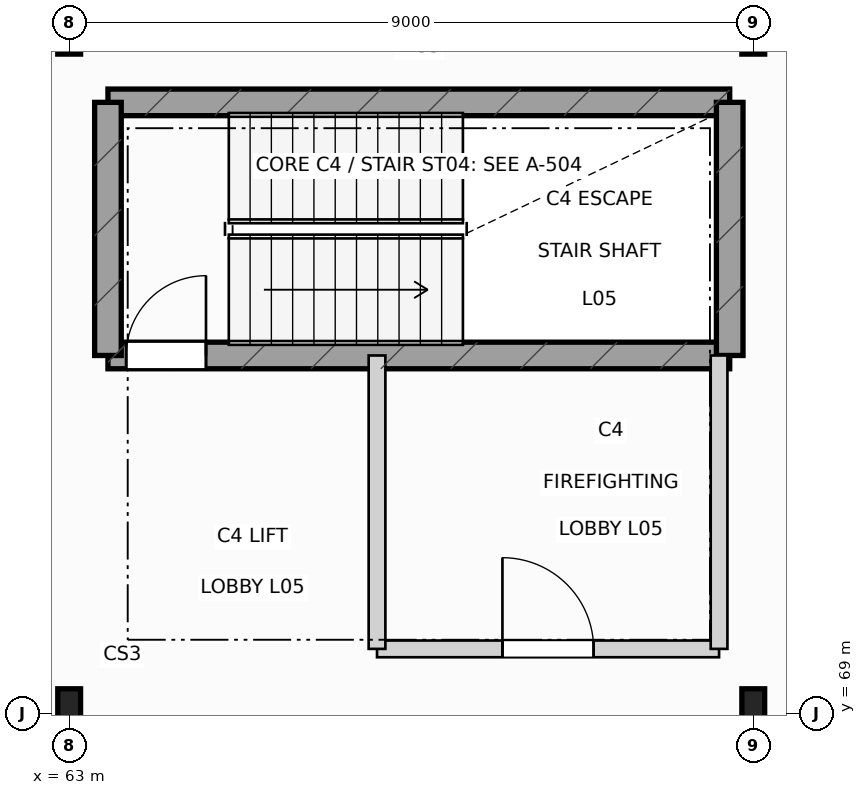
"""IFC4 building model, lengths in metres.
Left out: names, types, materials, properties, quantities, classifications, styles, units other than length and angle.
Written with IfcOpenShell. Run it as: python <this file> out.ifc"""

import sys

from ifc_helpers import new_model, si_unit, direction, frame, frame_2d, origin, origin_2d, place, context, subcontext, project, spatial, rectangle, i_section, extrude, element, fill, save


model = new_model("IFC4")
c1 = context("Model", 3, precision=1e-05, world=origin(), true_north=direction((0.0, 1.0)))
c2 = subcontext(c1, "Body", "Model", "MODEL_VIEW")
j1 = project(units=[si_unit("LENGTHUNIT", "METRE"), si_unit("PLANEANGLEUNIT", "RADIAN")], contexts=[c1])
p1 = place(None, origin())
s1 = spatial("IfcSite", under=j1, at=p1, CompositionType="ELEMENT")
p2 = place(p1, origin())
s2 = spatial("IfcBuilding", under=s1, at=p2, CompositionType="ELEMENT")
p3 = place(p2, frame((0.0, 0.0, 26.4)))
s3 = spatial("IfcBuildingStorey", under=s2, at=p3, CompositionType="ELEMENT", Elevation=26.4)
for number, where, z_axis, x_axis in (
    (1, (63.0, 69.0, 0.0), (0.0, 0.0, 1.0), (1.0, 0.0, 0.0)),
    (2, (63.0, 78.0, 0.0), (0.0, 0.0, 1.0), (1.0, 0.0, 0.0)),
    (3, (72.0, 69.0, 0.0), (0.0, 0.0, 1.0), (1.0, 0.0, 0.0)),
    (4, (72.0, 78.0, 0.0), (0.0, 0.0, 1.0), (1.0, 0.0, 0.0)),
):
    element("IfcColumn", number, at=place(p3, frame(where, z_axis=z_axis, x_axis=x_axis)), inside=s3, PredefinedType="COLUMN", context=c2, shape_type="SweptSolid", body=[
        extrude(i_section(OverallWidth=0.3, OverallDepth=0.65, WebThickness=0.016, FlangeThickness=0.031, at=origin_2d()), origin(), (0.0, 0.0, 1.0), 4.2),
    ])
p4 = place(p3, frame((63.51, 73.71, 0.0), z_axis=(0.0, 0.0, 1.0), x_axis=(1.0, 0.0, 0.0)))
e5 = element("IfcWall", 5, at=p4, inside=s3, PredefinedType="SHEAR", context=c2, shape_type="SweptSolid", body=[
    extrude(rectangle(XDim=8.18, YDim=0.35, at=frame_2d((4.09, 0.0))), origin(), (0.0, 0.0, 1.0), 3.94),
])
p5 = place(p4, frame((0.24, 0.0, 0.0)))
e6 = element("IfcOpeningElement", 6, at=p5, cuts=e5, PredefinedType="OPENING", context=c2, shape_type="SweptSolid", body=[
    extrude(rectangle(XDim=1.05, YDim=2.18, at=frame_2d((0.525, 1.09))), frame((0.0, 0.185, 0.0), z_axis=(0.0, -1.0, 0.0), x_axis=(1.0, 0.0, 0.0)), (0.0, 0.0, 1.0), 0.37),
])
p6 = place(p3, frame((63.51, 77.04, 0.0), z_axis=(0.0, 0.0, 1.0), x_axis=(1.0, 0.0, 0.0)))
e7 = element("IfcWall", 7, at=p6, inside=s3, PredefinedType="SHEAR", context=c2, shape_type="SweptSolid", body=[
    extrude(rectangle(XDim=8.18, YDim=0.35, at=frame_2d((4.09, 0.0))), origin(), (0.0, 0.0, 1.0), 3.94),
])
for number, where, z_axis, x_axis in (
    (8, (63.51, 73.71, 0.0), (0.0, 0.0, 1.0), (0.0, 1.0, 0.0)),
    (9, (71.69, 73.71, 0.0), (0.0, 0.0, 1.0), (0.0, 1.0, 0.0)),
):
    element("IfcWall", number, at=place(p3, frame(where, z_axis=z_axis, x_axis=x_axis)), inside=s3, PredefinedType="SHEAR", context=c2, shape_type="SweptSolid", body=[
        extrude(rectangle(XDim=3.33, YDim=0.35, at=frame_2d((1.665, 0.0))), origin(), (0.0, 0.0, 1.0), 3.94),
    ])
p7 = place(p3, frame((67.05, 69.85, 0.0), z_axis=(0.0, 0.0, 1.0), x_axis=(1.0, 0.0, 0.0)))
e10 = element("IfcWall", 10, at=p7, inside=s3, PredefinedType="PARTITIONING", context=c2, shape_type="SweptSolid", body=[
    extrude(rectangle(XDim=4.5, YDim=0.22, at=frame_2d((2.25, 0.0))), origin(), (0.0, 0.0, 1.0), 3.305),
])
p8 = place(p7, frame((1.65, 0.0, 0.0)))
e11 = element("IfcOpeningElement", 11, at=p8, cuts=e10, PredefinedType="OPENING", context=c2, shape_type="SweptSolid", body=[
    extrude(rectangle(XDim=1.2, YDim=2.18, at=frame_2d((0.6, 1.09))), frame((0.0, 0.12, 0.0), z_axis=(0.0, -1.0, 0.0), x_axis=(1.0, 0.0, 0.0)), (0.0, 0.0, 1.0), 0.24),
])
p9 = place(p3, frame((67.05, 69.85, 0.0), z_axis=(0.0, 0.0, 1.0), x_axis=(0.0, 1.0, 0.0)))
e12 = element("IfcWall", 12, at=p9, inside=s3, PredefinedType="PARTITIONING", context=c2, shape_type="SweptSolid", body=[
    extrude(rectangle(XDim=3.86, YDim=0.22, at=frame_2d((1.93, 0.0))), origin(), (0.0, 0.0, 1.0), 3.665),
])
p10 = place(p3, frame((71.55, 69.85, 0.0), z_axis=(0.0, 0.0, 1.0), x_axis=(0.0, 1.0, 0.0)))
e13 = element("IfcWall", 13, at=p10, inside=s3, PredefinedType="PARTITIONING", context=c2, shape_type="SweptSolid", body=[
    extrude(rectangle(XDim=3.86, YDim=0.22, at=frame_2d((1.93, 0.0))), origin(), (0.0, 0.0, 1.0), 3.305),
])
p11 = place(p5, origin())
e14 = element("IfcDoor", 14, at=p11, inside=s3, OperationType="SINGLE_SWING_RIGHT", PredefinedType="DOOR", context=c2, shape_type="SweptSolid", body=[
    extrude(rectangle(XDim=1.05, YDim=2.18, at=frame_2d((0.525, 1.09))), frame((0.0, 0.025, 0.0), z_axis=(0.0, -1.0, 0.0), x_axis=(1.0, 0.0, 0.0)), (0.0, 0.0, 1.0), 0.05),
])
fill(e6, e14)
p12 = place(p8, origin())
e15 = element("IfcDoor", 15, at=p12, inside=s3, OperationType="SINGLE_SWING_LEFT", PredefinedType="DOOR", context=c2, shape_type="SweptSolid", body=[
    extrude(rectangle(XDim=1.2, YDim=2.18, at=frame_2d((0.6, 1.09))), frame((0.0, 0.025, 0.0), z_axis=(0.0, -1.0, 0.0), x_axis=(1.0, 0.0, 0.0)), (0.0, 0.0, 1.0), 0.05),
])
fill(e11, e15)
save(model, sys.argv[1])
